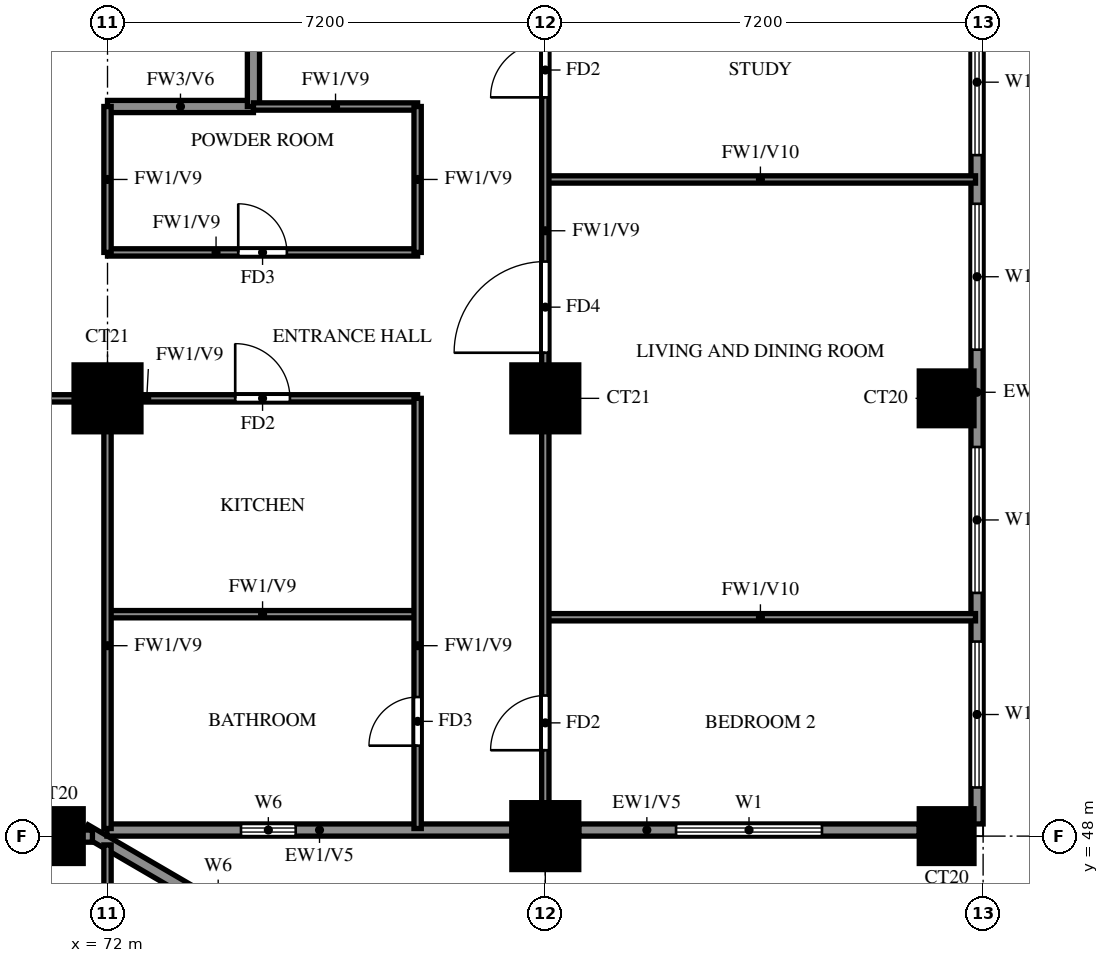
"""IFC4 building model, lengths in metres.
Left out: names, types, materials, properties, quantities, classifications, styles, units other than length and angle.
Written with IfcOpenShell. Run it as: python <this file> out.ifc"""

import sys

from ifc_helpers import new_model, si_unit, direction, frame, frame_2d, origin, origin_2d, place, context, subcontext, project, spatial, rectangle, extrude, source, transform, mapped, element, fill, save


model = new_model("IFC4")
c1 = context("Model", 3, precision=1e-05, world=origin(), true_north=direction((0.0, 1.0)))
c2 = subcontext(c1, "Body", "Model", "MODEL_VIEW")
j1 = project(units=[si_unit("LENGTHUNIT", "METRE"), si_unit("PLANEANGLEUNIT", "RADIAN")], contexts=[c1])
p1 = place(None, origin())
s1 = spatial("IfcSite", under=j1, at=p1, CompositionType="ELEMENT")
p2 = place(p1, origin())
s2 = spatial("IfcBuilding", under=s1, at=p2, CompositionType="ELEMENT")
p3 = place(p2, frame((0.0, 0.0, 134.0)))
s3 = spatial("IfcBuildingStorey", under=s2, at=p3, CompositionType="ELEMENT", Elevation=134.0)
m1 = source(origin(), c2, "Body", "SweptSolid", [
    extrude(rectangle(XDim=0.9, YDim=0.9, at=origin_2d()), origin(), (0.0, 0.0, 1.0), 3.15),
])
p4 = place(p3, frame((71.15, 48.0, 0.0), z_axis=(0.0, 0.0, 1.0), x_axis=(1.0, 0.0, 0.0)))
e1 = element("IfcColumn", 1, at=p4, inside=s3, PredefinedType="COLUMN", context=c2, shape_type="MappedRepresentation", body=[
    mapped(m1, transform((0.0, 0.0, 0.0))),
])
m2 = source(origin(), c2, "Body", "SweptSolid", [
    extrude(rectangle(XDim=1.1, YDim=1.1, at=origin_2d()), origin(), (0.0, 0.0, 1.0), 3.15),
])
p5 = place(p3, frame((79.2, 48.0, 0.0), z_axis=(0.0, 0.0, 1.0), x_axis=(1.0, 0.0, 0.0)))
e2 = element("IfcColumn", 2, at=p5, inside=s3, PredefinedType="COLUMN", context=c2, shape_type="MappedRepresentation", body=[
    mapped(m2, transform((0.0, 0.0, 0.0))),
])
p6 = place(p3, frame((85.8, 48.0, 0.0), z_axis=(0.0, 0.0, 1.0), x_axis=(1.0, 0.0, 0.0)))
e3 = element("IfcColumn", 3, at=p6, inside=s3, PredefinedType="COLUMN", context=c2, shape_type="MappedRepresentation", body=[
    mapped(m1, transform((0.0, 0.0, 0.0))),
])
for number, where, z_axis, x_axis in (
    (4, (72.0, 55.2, 0.0), (0.0, 0.0, 1.0), (1.0, 0.0, 0.0)),
    (5, (79.2, 55.2, 0.0), (0.0, 0.0, 1.0), (1.0, 0.0, 0.0)),
):
    element("IfcColumn", number, at=place(p3, frame(where, z_axis=z_axis, x_axis=x_axis)), inside=s3, PredefinedType="COLUMN", context=c2, shape_type="MappedRepresentation", body=[
        mapped(m2, transform((0.0, 0.0, 0.0))),
    ])
p7 = place(p3, frame((85.8, 55.2, 0.0), z_axis=(0.0, 0.0, 1.0), x_axis=(1.0, 0.0, 0.0)))
e6 = element("IfcColumn", 6, at=p7, inside=s3, PredefinedType="COLUMN", context=c2, shape_type="MappedRepresentation", body=[
    mapped(m1, transform((0.0, 0.0, 0.0))),
])
p8 = place(p3, frame((85.719, 39.881, 0.0), z_axis=(0.0, 0.0, 1.0), x_axis=(-0.86377618652, 0.503875678716, 0.0)))
e7 = element("IfcWall", 7, at=p8, inside=s3, PredefinedType="SOLIDWALL", context=c2, shape_type="SweptSolid", body=[
    extrude(rectangle(XDim=16.311, YDim=0.2, at=frame_2d((8.156, 0.0))), origin(), (0.0, 0.0, 1.0), 3.15),
])
p9 = place(p8, frame((13.326, 0.0, 1.5)))
e8 = element("IfcOpeningElement", 8, at=p9, cuts=e7, PredefinedType="OPENING", context=c2, shape_type="SweptSolid", body=[
    extrude(rectangle(XDim=0.9, YDim=0.9, at=frame_2d((0.45, 0.45))), frame((0.0, 0.11, 0.0), z_axis=(0.0, -1.0, 0.0), x_axis=(1.0, 0.0, 0.0)), (0.0, 0.0, 1.0), 0.22),
])
p10 = place(p3, frame((71.99, 48.1, 0.0), z_axis=(0.0, 0.0, 1.0), x_axis=(1.0, 0.0, 0.0)))
e9 = element("IfcWall", 9, at=p10, inside=s3, PredefinedType="SOLIDWALL", context=c2, shape_type="SweptSolid", body=[
    extrude(rectangle(XDim=6.66, YDim=0.2, at=frame_2d((3.33, 0.0))), origin(), (0.0, 0.0, 1.0), 3.15),
])
p11 = place(p10, frame((2.205, 0.0, 1.5)))
e10 = element("IfcOpeningElement", 10, at=p11, cuts=e9, PredefinedType="OPENING", context=c2, shape_type="SweptSolid", body=[
    extrude(rectangle(XDim=0.9, YDim=0.9, at=frame_2d((0.45, 0.45))), frame((0.0, 0.11, 0.0), z_axis=(0.0, -1.0, 0.0), x_axis=(1.0, 0.0, 0.0)), (0.0, 0.0, 1.0), 0.22),
])
p12 = place(p3, frame((79.75, 48.1, 0.0), z_axis=(0.0, 0.0, 1.0), x_axis=(1.0, 0.0, 0.0)))
e11 = element("IfcWall", 11, at=p12, inside=s3, PredefinedType="SOLIDWALL", context=c2, shape_type="SweptSolid", body=[
    extrude(rectangle(XDim=5.6, YDim=0.2, at=frame_2d((2.8, 0.0))), origin(), (0.0, 0.0, 1.0), 3.15),
])
p13 = place(p12, frame((1.6, 0.0, 0.6)))
e12 = element("IfcOpeningElement", 12, at=p13, cuts=e11, PredefinedType="OPENING", context=c2, shape_type="SweptSolid", body=[
    extrude(rectangle(XDim=2.4, YDim=2.4, at=frame_2d((1.2, 1.2))), frame((0.0, 0.11, 0.0), z_axis=(0.0, -1.0, 0.0), x_axis=(1.0, 0.0, 0.0)), (0.0, 0.0, 1.0), 0.22),
])
p14 = place(p3, frame((86.3, 48.2, 0.0), z_axis=(0.0, 0.0, 1.0), x_axis=(0.0, 1.0, 0.0)))
e13 = element("IfcWall", 13, at=p14, inside=s3, PredefinedType="SOLIDWALL", context=c2, shape_type="SweptSolid", body=[
    extrude(rectangle(XDim=14.2, YDim=0.2, at=frame_2d((7.1, 0.0))), origin(), (0.0, 0.0, 1.0), 3.15),
])
p15 = place(p14, frame((0.6, 0.0, 0.6)))
e14 = element("IfcOpeningElement", 14, at=p15, cuts=e13, PredefinedType="OPENING", context=c2, shape_type="SweptSolid", body=[
    extrude(rectangle(XDim=2.4, YDim=2.4, at=frame_2d((1.2, 1.2))), frame((0.0, 0.11, 0.0), z_axis=(0.0, -1.0, 0.0), x_axis=(1.0, 0.0, 0.0)), (0.0, 0.0, 1.0), 0.22),
])
p16 = place(p14, frame((3.8, 0.0, 0.6)))
e15 = element("IfcOpeningElement", 15, at=p16, cuts=e13, PredefinedType="OPENING", context=c2, shape_type="SweptSolid", body=[
    extrude(rectangle(XDim=2.4, YDim=2.4, at=frame_2d((1.2, 1.2))), frame((0.0, 0.11, 0.0), z_axis=(0.0, -1.0, 0.0), x_axis=(1.0, 0.0, 0.0)), (0.0, 0.0, 1.0), 0.22),
])
p17 = place(p14, frame((7.8, 0.0, 0.6)))
e16 = element("IfcOpeningElement", 16, at=p17, cuts=e13, PredefinedType="OPENING", context=c2, shape_type="SweptSolid", body=[
    extrude(rectangle(XDim=2.4, YDim=2.4, at=frame_2d((1.2, 1.2))), frame((0.0, 0.11, 0.0), z_axis=(0.0, -1.0, 0.0), x_axis=(1.0, 0.0, 0.0)), (0.0, 0.0, 1.0), 0.22),
])
p18 = place(p14, frame((11.0, 0.0, 0.6)))
e17 = element("IfcOpeningElement", 17, at=p18, cuts=e13, PredefinedType="OPENING", context=c2, shape_type="SweptSolid", body=[
    extrude(rectangle(XDim=2.4, YDim=2.4, at=frame_2d((1.2, 1.2))), frame((0.0, 0.11, 0.0), z_axis=(0.0, -1.0, 0.0), x_axis=(1.0, 0.0, 0.0)), (0.0, 0.0, 1.0), 0.22),
])
p19 = place(p3, frame((72.0, 60.0, 0.0), z_axis=(0.0, 0.0, 1.0), x_axis=(1.0, 0.0, 0.0)))
e18 = element("IfcWall", 18, at=p19, inside=s3, PredefinedType="SOLIDWALL", context=c2, shape_type="SweptSolid", body=[
    extrude(rectangle(XDim=2.4, YDim=0.2, at=frame_2d((1.2, 0.0))), origin(), (0.0, 0.0, 1.0), 3.15),
])
p20 = place(p3, frame((74.4, 60.0, 0.0), z_axis=(0.0, 0.0, 1.0), x_axis=(0.0, 1.0, 0.0)))
e19 = element("IfcWall", 19, at=p20, inside=s3, PredefinedType="SOLIDWALL", context=c2, shape_type="SweptSolid", body=[
    extrude(rectangle(XDim=9.45, YDim=0.2, at=frame_2d((4.725, 0.0))), origin(), (0.0, 0.0, 1.0), 3.15),
])
p21 = place(p20, frame((3.1, 0.0, 0.0)))
e20 = element("IfcOpeningElement", 20, at=p21, cuts=e19, PredefinedType="OPENING", context=c2, shape_type="SweptSolid", body=[
    extrude(rectangle(XDim=1.0, YDim=2.1, at=frame_2d((0.5, 1.05))), frame((0.0, 0.11, 0.0), z_axis=(0.0, -1.0, 0.0), x_axis=(1.0, 0.0, 0.0)), (0.0, 0.0, 1.0), 0.22),
])
p22 = place(p3, frame((67.2, 48.0, 0.0), z_axis=(0.0, 0.0, 1.0), x_axis=(1.0, 0.0, 0.0)))
e21 = element("IfcWall", 21, at=p22, inside=s3, PredefinedType="SOLIDWALL", context=c2, shape_type="SweptSolid", body=[
    extrude(rectangle(XDim=4.552, YDim=0.2, at=frame_2d((2.276, 0.0))), origin(), (0.0, 0.0, 1.0), 3.15),
])
p23 = place(p3, frame((79.2, 51.6, 0.0), z_axis=(0.0, 0.0, 1.0), x_axis=(1.0, 0.0, 0.0)))
e22 = element("IfcWall", 22, at=p23, inside=s3, PredefinedType="PARTITIONING", context=c2, shape_type="SweptSolid", body=[
    extrude(rectangle(XDim=7.075, YDim=0.12, at=frame_2d((3.538, 0.0))), origin(), (0.0, 0.0, 1.0), 2.25),
])
p24 = place(p3, frame((72.0, 51.65, 0.0), z_axis=(0.0, 0.0, 1.0), x_axis=(1.0, 0.0, 0.0)))
e23 = element("IfcWall", 23, at=p24, inside=s3, PredefinedType="PARTITIONING", context=c2, shape_type="SweptSolid", body=[
    extrude(rectangle(XDim=5.1, YDim=0.12, at=frame_2d((2.55, 0.0))), origin(), (0.0, 0.0, 1.0), 3.15),
])
p25 = place(p3, frame((67.2, 55.2, 0.0), z_axis=(0.0, 0.0, 1.0), x_axis=(1.0, 0.0, 0.0)))
e24 = element("IfcWall", 24, at=p25, inside=s3, PredefinedType="PARTITIONING", context=c2, shape_type="SweptSolid", body=[
    extrude(rectangle(XDim=9.9, YDim=0.12, at=frame_2d((4.95, 0.0))), origin(), (0.0, 0.0, 1.0), 3.15),
])
p26 = place(p25, frame((6.9, 0.0, 0.0)))
e25 = element("IfcOpeningElement", 25, at=p26, cuts=e24, PredefinedType="OPENING", context=c2, shape_type="SweptSolid", body=[
    extrude(rectangle(XDim=0.9, YDim=2.1, at=frame_2d((0.45, 1.05))), frame((0.0, 0.07, 0.0), z_axis=(0.0, -1.0, 0.0), x_axis=(1.0, 0.0, 0.0)), (0.0, 0.0, 1.0), 0.14),
])
p27 = place(p25, frame((1.95, 0.0, 0.0)))
e26 = element("IfcOpeningElement", 26, at=p27, cuts=e24, PredefinedType="OPENING", context=c2, shape_type="SweptSolid", body=[
    extrude(rectangle(XDim=0.9, YDim=2.1, at=frame_2d((0.45, 1.05))), frame((0.0, 0.07, 0.0), z_axis=(0.0, -1.0, 0.0), x_axis=(1.0, 0.0, 0.0)), (0.0, 0.0, 1.0), 0.14),
])
p28 = place(p3, frame((72.0, 57.6, 0.0), z_axis=(0.0, 0.0, 1.0), x_axis=(1.0, 0.0, 0.0)))
e27 = element("IfcWall", 27, at=p28, inside=s3, PredefinedType="PARTITIONING", context=c2, shape_type="SweptSolid", body=[
    extrude(rectangle(XDim=5.1, YDim=0.12, at=frame_2d((2.55, 0.0))), origin(), (0.0, 0.0, 1.0), 3.15),
])
p29 = place(p28, frame((2.15, 0.0, 0.0)))
e28 = element("IfcOpeningElement", 28, at=p29, cuts=e27, PredefinedType="OPENING", context=c2, shape_type="SweptSolid", body=[
    extrude(rectangle(XDim=0.8, YDim=2.1, at=frame_2d((0.4, 1.05))), frame((0.0, 0.07, 0.0), z_axis=(0.0, -1.0, 0.0), x_axis=(1.0, 0.0, 0.0)), (0.0, 0.0, 1.0), 0.14),
])
p30 = place(p3, frame((79.2, 58.8, 0.0), z_axis=(0.0, 0.0, 1.0), x_axis=(1.0, 0.0, 0.0)))
e29 = element("IfcWall", 29, at=p30, inside=s3, PredefinedType="PARTITIONING", context=c2, shape_type="SweptSolid", body=[
    extrude(rectangle(XDim=7.075, YDim=0.12, at=frame_2d((3.538, 0.0))), origin(), (0.0, 0.0, 1.0), 2.25),
])
p31 = place(p3, frame((74.4, 60.0, 0.0), z_axis=(0.0, 0.0, 1.0), x_axis=(1.0, 0.0, 0.0)))
e30 = element("IfcWall", 30, at=p31, inside=s3, PredefinedType="PARTITIONING", context=c2, shape_type="SweptSolid", body=[
    extrude(rectangle(XDim=2.7, YDim=0.12, at=frame_2d((1.35, 0.0))), origin(), (0.0, 0.0, 1.0), 3.15),
])
p32 = place(p3, frame((72.0, 39.725, 0.0), z_axis=(0.0, 0.0, 1.0), x_axis=(0.0, 1.0, 0.0)))
e31 = element("IfcWall", 31, at=p32, inside=s3, PredefinedType="PARTITIONING", context=c2, shape_type="SweptSolid", body=[
    extrude(rectangle(XDim=8.13, YDim=0.12, at=frame_2d((4.065, 0.0))), origin(), (0.0, 0.0, 1.0), 2.25),
])
p33 = place(p32, frame((1.788, 0.0, 0.0)))
e32 = element("IfcOpeningElement", 32, at=p33, cuts=e31, PredefinedType="OPENING", context=c2, shape_type="SweptSolid", body=[
    extrude(rectangle(XDim=0.9, YDim=2.1, at=frame_2d((0.45, 1.05))), frame((0.0, 0.07, 0.0), z_axis=(0.0, -1.0, 0.0), x_axis=(1.0, 0.0, 0.0)), (0.0, 0.0, 1.0), 0.14),
])
p34 = place(p32, frame((4.575, 0.0, 0.0)))
e33 = element("IfcOpeningElement", 33, at=p34, cuts=e31, PredefinedType="OPENING", context=c2, shape_type="SweptSolid", body=[
    extrude(rectangle(XDim=0.8, YDim=2.1, at=frame_2d((0.4, 1.05))), frame((0.0, 0.07, 0.0), z_axis=(0.0, -1.0, 0.0), x_axis=(1.0, 0.0, 0.0)), (0.0, 0.0, 1.0), 0.14),
])
p35 = place(p3, frame((72.0, 48.125, 0.0), z_axis=(0.0, 0.0, 1.0), x_axis=(0.0, 1.0, 0.0)))
e34 = element("IfcWall", 34, at=p35, inside=s3, PredefinedType="PARTITIONING", context=c2, shape_type="SweptSolid", body=[
    extrude(rectangle(XDim=7.075, YDim=0.12, at=frame_2d((3.538, 0.0))), origin(), (0.0, 0.0, 1.0), 3.15),
])
p36 = place(p3, frame((72.0, 57.6, 0.0), z_axis=(0.0, 0.0, 1.0), x_axis=(0.0, 1.0, 0.0)))
e35 = element("IfcWall", 35, at=p36, inside=s3, PredefinedType="PARTITIONING", context=c2, shape_type="SweptSolid", body=[
    extrude(rectangle(XDim=2.4, YDim=0.12, at=frame_2d((1.2, 0.0))), origin(), (0.0, 0.0, 1.0), 3.15),
])
p37 = place(p3, frame((77.1, 48.125, 0.0), z_axis=(0.0, 0.0, 1.0), x_axis=(0.0, 1.0, 0.0)))
e36 = element("IfcWall", 36, at=p37, inside=s3, PredefinedType="PARTITIONING", context=c2, shape_type="SweptSolid", body=[
    extrude(rectangle(XDim=7.075, YDim=0.12, at=frame_2d((3.538, 0.0))), origin(), (0.0, 0.0, 1.0), 3.15),
])
p38 = place(p37, frame((1.363, 0.0, 0.0)))
e37 = element("IfcOpeningElement", 37, at=p38, cuts=e36, PredefinedType="OPENING", context=c2, shape_type="SweptSolid", body=[
    extrude(rectangle(XDim=0.8, YDim=2.1, at=frame_2d((0.4, 1.05))), frame((0.0, 0.07, 0.0), z_axis=(0.0, -1.0, 0.0), x_axis=(1.0, 0.0, 0.0)), (0.0, 0.0, 1.0), 0.14),
])
p39 = place(p3, frame((77.1, 57.6, 0.0), z_axis=(0.0, 0.0, 1.0), x_axis=(0.0, 1.0, 0.0)))
e38 = element("IfcWall", 38, at=p39, inside=s3, PredefinedType="PARTITIONING", context=c2, shape_type="SweptSolid", body=[
    extrude(rectangle(XDim=2.4, YDim=0.12, at=frame_2d((1.2, 0.0))), origin(), (0.0, 0.0, 1.0), 3.15),
])
p40 = place(p3, frame((79.2, 48.125, 0.0), z_axis=(0.0, 0.0, 1.0), x_axis=(0.0, 1.0, 0.0)))
e39 = element("IfcWall", 39, at=p40, inside=s3, PredefinedType="PARTITIONING", context=c2, shape_type="SweptSolid", body=[
    extrude(rectangle(XDim=17.875, YDim=0.12, at=frame_2d((8.938, 0.0))), origin(), (0.0, 0.0, 1.0), 3.15),
])
p41 = place(p40, frame((1.288, 0.0, 0.0)))
e40 = element("IfcOpeningElement", 40, at=p41, cuts=e39, PredefinedType="OPENING", context=c2, shape_type="SweptSolid", body=[
    extrude(rectangle(XDim=0.9, YDim=2.1, at=frame_2d((0.45, 1.05))), frame((0.0, 0.07, 0.0), z_axis=(0.0, -1.0, 0.0), x_axis=(1.0, 0.0, 0.0)), (0.0, 0.0, 1.0), 0.14),
])
p42 = place(p40, frame((7.825, 0.0, 0.0)))
e41 = element("IfcOpeningElement", 41, at=p42, cuts=e39, PredefinedType="OPENING", context=c2, shape_type="SweptSolid", body=[
    extrude(rectangle(XDim=1.5, YDim=2.1, at=frame_2d((0.75, 1.05))), frame((0.0, 0.07, 0.0), z_axis=(0.0, -1.0, 0.0), x_axis=(1.0, 0.0, 0.0)), (0.0, 0.0, 1.0), 0.14),
])
p43 = place(p40, frame((12.025, 0.0, 0.0)))
e42 = element("IfcOpeningElement", 42, at=p43, cuts=e39, PredefinedType="OPENING", context=c2, shape_type="SweptSolid", body=[
    extrude(rectangle(XDim=0.9, YDim=2.1, at=frame_2d((0.45, 1.05))), frame((0.0, 0.07, 0.0), z_axis=(0.0, -1.0, 0.0), x_axis=(1.0, 0.0, 0.0)), (0.0, 0.0, 1.0), 0.14),
])
p44 = place(p40, frame((15.625, 0.0, 0.0)))
e43 = element("IfcOpeningElement", 43, at=p44, cuts=e39, PredefinedType="OPENING", context=c2, shape_type="SweptSolid", body=[
    extrude(rectangle(XDim=0.9, YDim=2.1, at=frame_2d((0.45, 1.05))), frame((0.0, 0.07, 0.0), z_axis=(0.0, -1.0, 0.0), x_axis=(1.0, 0.0, 0.0)), (0.0, 0.0, 1.0), 0.14),
])
p45 = place(p11, origin())
e44 = element("IfcWindow", 44, at=p45, inside=s3, PartitioningType="SINGLE_PANEL", PredefinedType="WINDOW", context=c2, shape_type="SweptSolid", body=[
    extrude(rectangle(XDim=0.9, YDim=0.9, at=frame_2d((0.45, 0.45))), frame((0.0, 0.03, 0.0), z_axis=(0.0, -1.0, 0.0), x_axis=(1.0, 0.0, 0.0)), (0.0, 0.0, 1.0), 0.06),
])
fill(e10, e44)
p46 = place(p13, origin())
e45 = element("IfcWindow", 45, at=p46, inside=s3, PartitioningType="DOUBLE_PANEL_VERTICAL", PredefinedType="WINDOW", context=c2, shape_type="SweptSolid", body=[
    extrude(rectangle(XDim=2.4, YDim=2.4, at=frame_2d((1.2, 1.2))), frame((0.0, 0.03, 0.0), z_axis=(0.0, -1.0, 0.0), x_axis=(1.0, 0.0, 0.0)), (0.0, 0.0, 1.0), 0.06),
])
fill(e12, e45)
p47 = place(p15, origin())
e46 = element("IfcWindow", 46, at=p47, inside=s3, PartitioningType="DOUBLE_PANEL_VERTICAL", PredefinedType="WINDOW", context=c2, shape_type="SweptSolid", body=[
    extrude(rectangle(XDim=2.4, YDim=2.4, at=frame_2d((1.2, 1.2))), frame((0.0, 0.03, 0.0), z_axis=(0.0, -1.0, 0.0), x_axis=(1.0, 0.0, 0.0)), (0.0, 0.0, 1.0), 0.06),
])
fill(e14, e46)
p48 = place(p16, origin())
e47 = element("IfcWindow", 47, at=p48, inside=s3, PartitioningType="DOUBLE_PANEL_VERTICAL", PredefinedType="WINDOW", context=c2, shape_type="SweptSolid", body=[
    extrude(rectangle(XDim=2.4, YDim=2.4, at=frame_2d((1.2, 1.2))), frame((0.0, 0.03, 0.0), z_axis=(0.0, -1.0, 0.0), x_axis=(1.0, 0.0, 0.0)), (0.0, 0.0, 1.0), 0.06),
])
fill(e15, e47)
p49 = place(p17, origin())
e48 = element("IfcWindow", 48, at=p49, inside=s3, PartitioningType="DOUBLE_PANEL_VERTICAL", PredefinedType="WINDOW", context=c2, shape_type="SweptSolid", body=[
    extrude(rectangle(XDim=2.4, YDim=2.4, at=frame_2d((1.2, 1.2))), frame((0.0, 0.03, 0.0), z_axis=(0.0, -1.0, 0.0), x_axis=(1.0, 0.0, 0.0)), (0.0, 0.0, 1.0), 0.06),
])
fill(e16, e48)
p50 = place(p18, origin())
e49 = element("IfcWindow", 49, at=p50, inside=s3, PartitioningType="DOUBLE_PANEL_VERTICAL", PredefinedType="WINDOW", context=c2, shape_type="SweptSolid", body=[
    extrude(rectangle(XDim=2.4, YDim=2.4, at=frame_2d((1.2, 1.2))), frame((0.0, 0.03, 0.0), z_axis=(0.0, -1.0, 0.0), x_axis=(1.0, 0.0, 0.0)), (0.0, 0.0, 1.0), 0.06),
])
fill(e17, e49)
p51 = place(p41, origin())
e50 = element("IfcDoor", 50, at=p51, inside=s3, OperationType="SINGLE_SWING_RIGHT", PredefinedType="DOOR", context=c2, shape_type="SweptSolid", body=[
    extrude(rectangle(XDim=0.9, YDim=2.1, at=frame_2d((0.45, 1.05))), frame((0.0, 0.025, 0.0), z_axis=(0.0, -1.0, 0.0), x_axis=(1.0, 0.0, 0.0)), (0.0, 0.0, 1.0), 0.05),
])
fill(e40, e50)
p52 = place(p42, origin())
e51 = element("IfcDoor", 51, at=p52, inside=s3, OperationType="SINGLE_SWING_RIGHT", PredefinedType="DOOR", context=c2, shape_type="SweptSolid", body=[
    extrude(rectangle(XDim=1.5, YDim=2.1, at=frame_2d((0.75, 1.05))), frame((0.0, 0.025, 0.0), z_axis=(0.0, -1.0, 0.0), x_axis=(1.0, 0.0, 0.0)), (0.0, 0.0, 1.0), 0.05),
])
fill(e41, e51)
p53 = place(p43, origin())
e52 = element("IfcDoor", 52, at=p53, inside=s3, OperationType="SINGLE_SWING_LEFT", PredefinedType="DOOR", context=c2, shape_type="SweptSolid", body=[
    extrude(rectangle(XDim=0.9, YDim=2.1, at=frame_2d((0.45, 1.05))), frame((0.0, 0.025, 0.0), z_axis=(0.0, -1.0, 0.0), x_axis=(1.0, 0.0, 0.0)), (0.0, 0.0, 1.0), 0.05),
])
fill(e42, e52)
p54 = place(p38, origin())
e53 = element("IfcDoor", 53, at=p54, inside=s3, OperationType="SINGLE_SWING_RIGHT", PredefinedType="DOOR", context=c2, shape_type="SweptSolid", body=[
    extrude(rectangle(XDim=0.8, YDim=2.1, at=frame_2d((0.4, 1.05))), frame((0.0, 0.025, 0.0), z_axis=(0.0, -1.0, 0.0), x_axis=(1.0, 0.0, 0.0)), (0.0, 0.0, 1.0), 0.05),
])
fill(e37, e53)
p55 = place(p26, origin())
e54 = element("IfcDoor", 54, at=p55, inside=s3, OperationType="SINGLE_SWING_LEFT", PredefinedType="DOOR", context=c2, shape_type="SweptSolid", body=[
    extrude(rectangle(XDim=0.9, YDim=2.1, at=frame_2d((0.45, 1.05))), frame((0.0, 0.025, 0.0), z_axis=(0.0, -1.0, 0.0), x_axis=(1.0, 0.0, 0.0)), (0.0, 0.0, 1.0), 0.05),
])
fill(e25, e54)
p56 = place(p29, origin())
e55 = element("IfcDoor", 55, at=p56, inside=s3, OperationType="SINGLE_SWING_LEFT", PredefinedType="DOOR", context=c2, shape_type="SweptSolid", body=[
    extrude(rectangle(XDim=0.8, YDim=2.1, at=frame_2d((0.4, 1.05))), frame((0.0, 0.025, 0.0), z_axis=(0.0, -1.0, 0.0), x_axis=(1.0, 0.0, 0.0)), (0.0, 0.0, 1.0), 0.05),
])
fill(e28, e55)
save(model, sys.argv[1])
